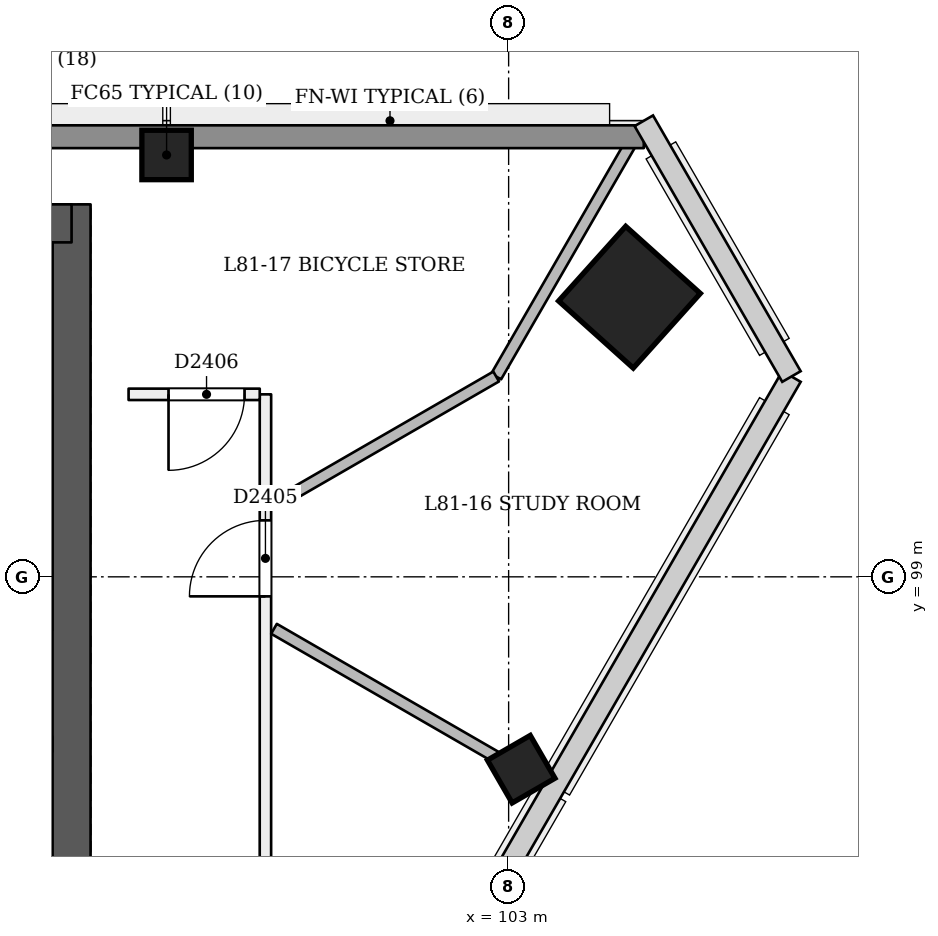
"""IFC4 building model, lengths in metres.
Left out: names, types, materials, properties, quantities, classifications, styles, units other than length and angle.
Written with IfcOpenShell. Run it as: python <this file> out.ifc"""

import sys

from ifc_helpers import new_model, si_unit, direction, frame, frame_2d, origin, origin_2d, place, context, subcontext, project, spatial, rectangle, extrude, element, fill, save


model = new_model("IFC4")
c1 = context("Model", 3, precision=1e-05, world=origin(), true_north=direction((0.0, 1.0)))
c2 = subcontext(c1, "Body", "Model", "MODEL_VIEW")
j1 = project(units=[si_unit("LENGTHUNIT", "METRE"), si_unit("PLANEANGLEUNIT", "RADIAN")], contexts=[c1])
p1 = place(None, origin())
s1 = spatial("IfcSite", under=j1, at=p1, CompositionType="ELEMENT")
p2 = place(p1, origin())
s2 = spatial("IfcBuilding", under=s1, at=p2, CompositionType="ELEMENT")
p3 = place(p2, frame((0.0, 0.0, 313.0)))
s3 = spatial("IfcBuildingStorey", under=s2, at=p3, CompositionType="ELEMENT", Elevation=313.0)
p4 = place(p3, frame((97.25, 93.15, 0.0), z_axis=(0.0, 0.0, 1.0), x_axis=(0.0, 1.0, 0.0)))
e1 = element("IfcWall", 1, at=p4, inside=s3, PredefinedType="SHEAR", context=c2, shape_type="SweptSolid", body=[
    extrude(rectangle(XDim=10.75, YDim=0.5, at=frame_2d((5.375, 0.0))), origin(), (0.0, 0.0, 1.0), 3.6),
])
p5 = place(p3, frame((97.25, 103.65, 0.0), z_axis=(0.0, 0.0, 1.0), x_axis=(-1.0, 0.0, 0.0)))
e2 = element("IfcWall", 2, at=p5, inside=s3, PredefinedType="SHEAR", context=c2, shape_type="SweptSolid", body=[
    extrude(rectangle(XDim=24.75, YDim=0.5, at=frame_2d((12.375, 0.0))), origin(), (0.0, 0.0, 1.0), 3.6),
])
p6 = place(p3, frame((104.624, 102.668, 0.0), z_axis=(-0.028401814599, 0.009218727412, 0.999554076572), x_axis=(0.500754933813, -0.865304134532, 0.022209255362)))
e3 = element("IfcColumn", 3, at=p6, inside=s3, PredefinedType="COLUMN", context=c2, shape_type="SweptSolid", body=[
    extrude(rectangle(XDim=1.32, YDim=1.32, at=origin_2d()), origin(), (0.0, 0.0, 1.0), 3.602),
])
p7 = place(p3, frame((98.5, 104.55, 0.0), z_axis=(0.0, 0.0, 1.0), x_axis=(1.0, 0.0, 0.0)))
e4 = element("IfcColumn", 4, at=p7, inside=s3, PredefinedType="COLUMN", context=c2, shape_type="SweptSolid", body=[
    extrude(rectangle(XDim=0.65, YDim=0.65, at=origin_2d()), origin(), (0.0, 0.0, 1.0), 3.6),
])
p8 = place(p3, frame((103.193, 96.422, -0.021), z_axis=(-0.022212386598, 0.038397631711, 0.99901563139), x_axis=(-0.499508070035, -0.866025254046, 0.02217988558)))
e5 = element("IfcColumn", 5, at=p8, inside=s3, PredefinedType="COLUMN", context=c2, shape_type="SweptSolid", body=[
    extrude(rectangle(XDim=0.65, YDim=0.65, at=origin_2d()), origin(), (0.0, 0.0, 1.0), 3.605),
])
p9 = place(p3, frame((99.8, 91.465, 0.0), z_axis=(0.0, 0.0, 1.0), x_axis=(4.9143671e-05, 0.999999998792, 0.0)))
e6 = element("IfcWall", 6, at=p9, inside=s3, PredefinedType="PARTITIONING", context=c2, shape_type="SweptSolid", body=[
    extrude(rectangle(XDim=9.936, YDim=0.15, at=frame_2d((4.968, 0.0))), origin(), (0.0, 0.0, 1.0), 3.2),
])
p10 = place(p9, frame((7.278, 0.0, 0.0)))
e7 = element("IfcOpeningElement", 7, at=p10, cuts=e6, PredefinedType="OPENING", context=c2, shape_type="SweptSolid", body=[
    extrude(rectangle(XDim=1.0, YDim=2.1, at=frame_2d((0.5, 1.05))), frame((0.0, 0.085, 0.0), z_axis=(0.0, -1.0, 0.0), x_axis=(1.0, 0.0, 0.0)), (0.0, 0.0, 1.0), 0.171),
])
p11 = place(p3, frame((99.726, 101.401, 0.0), z_axis=(0.0, 0.0, 1.0), x_axis=(-1.0, 0.0, 0.0)))
e8 = element("IfcWall", 8, at=p11, inside=s3, PredefinedType="PARTITIONING", context=c2, shape_type="SweptSolid", body=[
    extrude(rectangle(XDim=1.726, YDim=0.15, at=frame_2d((0.863, 0.0))), origin(), (0.0, 0.0, 1.0), 3.2),
])
p12 = place(p11, frame((0.2, 0.0, 0.0)))
e9 = element("IfcOpeningElement", 9, at=p12, cuts=e8, PredefinedType="OPENING", context=c2, shape_type="SweptSolid", body=[
    extrude(rectangle(XDim=1.0, YDim=2.1, at=frame_2d((0.5, 1.05))), frame((0.0, 0.085, 0.0), z_axis=(0.0, -1.0, 0.0), x_axis=(1.0, 0.0, 0.0)), (0.0, 0.0, 1.0), 0.171),
])
p13 = place(p3, frame((103.495, 96.248, 0.0), z_axis=(0.0, 0.0, 1.0), x_axis=(-0.866037172765, 0.499979614973, 0.0)))
e10 = element("IfcWall", 10, at=p13, inside=s3, PredefinedType="PARTITIONING", context=c2, shape_type="SweptSolid", body=[
    extrude(rectangle(XDim=4.136, YDim=0.15, at=frame_2d((2.068, 0.0))), origin(), (0.0, 0.0, 1.0), 2.7),
])
p14 = place(p3, frame((104.721, 104.9, 0.0), z_axis=(0.0, 0.0, 1.0), x_axis=(-0.499984077514, -0.866034596441, 0.0)))
e11 = element("IfcWall", 11, at=p14, inside=s3, PredefinedType="PARTITIONING", context=c2, shape_type="SweptSolid", body=[
    extrude(rectangle(XDim=3.77, YDim=0.15, at=frame_2d((1.885, 0.0))), origin(), (0.0, 0.0, 1.0), 2.7),
])
p15 = place(p3, frame((102.836, 101.635, 0.0), z_axis=(0.0, 0.0, 1.0), x_axis=(-0.866026575979, -0.499997969693, 0.0)))
e12 = element("IfcWall", 12, at=p15, inside=s3, PredefinedType="PARTITIONING", context=c2, shape_type="SweptSolid", body=[
    extrude(rectangle(XDim=3.375, YDim=0.15, at=frame_2d((1.688, 0.0))), origin(), (0.0, 0.0, 1.0), 3.2),
])
p16 = place(p3, frame((65.221, 104.79, 0.0), z_axis=(0.0, 0.0, 1.0), x_axis=(1.0, 0.0, 0.0)))
e13 = element("IfcWall", 13, at=p16, inside=s3, PredefinedType="SOLIDWALL", context=c2, shape_type="SweptSolid", body=[
    extrude(rectangle(XDim=39.557, YDim=0.3, at=frame_2d((19.779, 0.0))), origin(), (0.0, 0.0, 1.0), 2.7),
])
p17 = place(p10, origin())
e14 = element("IfcDoor", 14, at=p17, inside=s3, OperationType="SINGLE_SWING_LEFT", PredefinedType="NOTDEFINED", context=c2, shape_type="SweptSolid", body=[
    extrude(rectangle(XDim=1.0, YDim=2.1, at=frame_2d((0.5, 1.05))), frame((0.0, 0.025, 0.0), z_axis=(0.0, -1.0, 0.0), x_axis=(1.0, 0.0, 0.0)), (0.0, 0.0, 1.0), 0.05),
])
fill(e7, e14)
p18 = place(p12, origin())
e15 = element("IfcDoor", 15, at=p18, inside=s3, OperationType="SINGLE_SWING_RIGHT", PredefinedType="NOTDEFINED", context=c2, shape_type="SweptSolid", body=[
    extrude(rectangle(XDim=1.0, YDim=2.1, at=frame_2d((0.5, 1.05))), frame((0.0, 0.025, 0.0), z_axis=(0.0, -1.0, 0.0), x_axis=(1.0, 0.0, 0.0)), (0.0, 0.0, 1.0), 0.05),
])
fill(e9, e15)
save(model, sys.argv[1])
